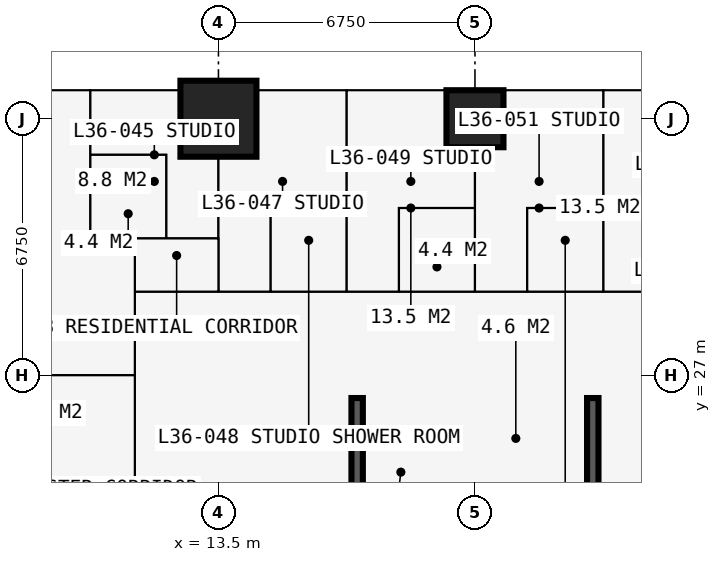
"""IFC4 building model, lengths in metres.
Left out: names, types, materials, properties, quantities, classifications, styles, units other than length and angle.
Written with IfcOpenShell. Run it as: python <this file> out.ifc"""

import sys

from ifc_helpers import new_model, si_unit, direction, frame, frame_2d, origin, origin_2d, place, context, subcontext, project, spatial, rectangle, extrude, element, fill, save


model = new_model("IFC4")
c1 = context("Model", 3, precision=1e-05, world=origin(), true_north=direction((0.0, 1.0)))
c2 = subcontext(c1, "Body", "Model", "MODEL_VIEW")
j1 = project(units=[si_unit("LENGTHUNIT", "METRE"), si_unit("PLANEANGLEUNIT", "RADIAN")], contexts=[c1])
p1 = place(None, origin())
s1 = spatial("IfcSite", under=j1, at=p1, CompositionType="ELEMENT")
p2 = place(p1, origin())
s2 = spatial("IfcBuilding", under=s1, at=p2, CompositionType="ELEMENT")
p3 = place(p2, frame((0.0, 0.0, 134.1)))
s3 = spatial("IfcBuildingStorey", under=s2, at=p3, CompositionType="ELEMENT", Elevation=134.1)
p4 = place(p3, frame((13.5, 33.75, 0.0), z_axis=(0.0, 0.0, 1.0), x_axis=(1.0, 0.0, 0.0)))
e1 = element("IfcColumn", 1, at=p4, inside=s3, PredefinedType="COLUMN", context=c2, shape_type="SweptSolid", body=[
    extrude(rectangle(XDim=2.0, YDim=2.0, at=origin_2d()), origin(), (0.0, 0.0, 1.0), 3.6),
])
p5 = place(p3, frame((20.25, 33.75, 0.0), z_axis=(0.0, 0.0, 1.0), x_axis=(1.0, 0.0, 0.0)))
e2 = element("IfcColumn", 2, at=p5, inside=s3, PredefinedType="COLUMN", context=c2, shape_type="SweptSolid", body=[
    extrude(rectangle(XDim=1.5, YDim=1.5, at=origin_2d()), origin(), (0.0, 0.0, 1.0), 3.6),
])
p6 = place(p3, frame((27.6, 27.0, 0.0), z_axis=(0.0, 0.0, 1.0), x_axis=(-1.0, 0.0, 0.0)))
e3 = element("IfcWall", 3, at=p6, inside=s3, PredefinedType="SHEAR", context=c2, shape_type="SweptSolid", body=[
    extrude(rectangle(XDim=14.7, YDim=1.2, at=frame_2d((7.35, 0.0))), origin(), (0.0, 0.0, 1.0), 3.6),
])
p7 = place(p6, frame((5.225, 0.0, 0.0)))
e4 = element("IfcOpeningElement", 4, at=p7, cuts=e3, PredefinedType="OPENING", context=c2, shape_type="SweptSolid", body=[
    extrude(rectangle(XDim=0.9, YDim=2.2, at=frame_2d((0.45, 1.1))), frame((0.0, 0.61, 0.0), z_axis=(0.0, -1.0, 0.0), x_axis=(1.0, 0.0, 0.0)), (0.0, 0.0, 1.0), 1.22),
])
p8 = place(p6, frame((8.2, 0.0, 0.0)))
e5 = element("IfcOpeningElement", 5, at=p8, cuts=e3, PredefinedType="OPENING", context=c2, shape_type="SweptSolid", body=[
    extrude(rectangle(XDim=1.0, YDim=2.2, at=frame_2d((0.5, 1.1))), frame((0.0, 0.61, 0.0), z_axis=(0.0, -1.0, 0.0), x_axis=(1.0, 0.0, 0.0)), (0.0, 0.0, 1.0), 1.22),
])
p9 = place(p3, frame((13.5, 26.4, 0.0), z_axis=(0.0, 0.0, 1.0), x_axis=(0.0, -1.0, 0.0)))
e6 = element("IfcWall", 6, at=p9, inside=s3, PredefinedType="SHEAR", context=c2, shape_type="SweptSolid", body=[
    extrude(rectangle(XDim=12.3, YDim=1.2, at=frame_2d((6.15, 0.0))), origin(), (0.0, 0.0, 1.0), 3.6),
])
p10 = place(p9, frame((7.45, 0.0, 0.0)))
e7 = element("IfcOpeningElement", 7, at=p10, cuts=e6, PredefinedType="OPENING", context=c2, shape_type="SweptSolid", body=[
    extrude(rectangle(XDim=1.2, YDim=2.2, at=frame_2d((0.6, 1.1))), frame((0.0, 0.61, 0.0), z_axis=(0.0, -1.0, 0.0), x_axis=(1.0, 0.0, 0.0)), (0.0, 0.0, 1.0), 1.22),
])
p11 = place(p3, frame((20.25, 34.5, 0.0), z_axis=(0.0, 0.0, 1.0), x_axis=(1.0, 0.0, 0.0)))
e8 = element("IfcWall", 8, at=p11, inside=s3, PredefinedType="SOLIDWALL", context=c2, shape_type="SweptSolid", body=[
    extrude(rectangle(XDim=6.75, YDim=0.15, at=frame_2d((3.375, 0.0))), origin(), (0.0, 0.0, 1.0), 3.3),
])
p12 = place(p11, frame((0.863, 0.0, 0.0)))
e9 = element("IfcOpeningElement", 9, at=p12, cuts=e8, PredefinedType="OPENING", context=c2, shape_type="SweptSolid", body=[
    extrude(rectangle(XDim=1.0, YDim=2.2, at=frame_2d((0.5, 1.1))), frame((0.0, 0.085, 0.0), z_axis=(0.0, -1.0, 0.0), x_axis=(1.0, 0.0, 0.0)), (0.0, 0.0, 1.0), 0.17),
])
p13 = place(p11, frame((1.975, 0.0, 0.9)))
e10 = element("IfcOpeningElement", 10, at=p13, cuts=e8, PredefinedType="OPENING", context=c2, shape_type="SweptSolid", body=[
    extrude(rectangle(XDim=1.2, YDim=1.8, at=frame_2d((0.6, 0.9))), frame((0.0, 0.085, 0.0), z_axis=(0.0, -1.0, 0.0), x_axis=(1.0, 0.0, 0.0)), (0.0, 0.0, 1.0), 0.17),
])
p14 = place(p11, frame((4.621, 0.0, 0.0)))
e11 = element("IfcOpeningElement", 11, at=p14, cuts=e8, PredefinedType="OPENING", context=c2, shape_type="SweptSolid", body=[
    extrude(rectangle(XDim=1.0, YDim=2.2, at=frame_2d((0.5, 1.1))), frame((0.0, 0.085, 0.0), z_axis=(0.0, -1.0, 0.0), x_axis=(1.0, 0.0, 0.0)), (0.0, 0.0, 1.0), 0.17),
])
p15 = place(p11, frame((3.592, 0.0, 0.9)))
e12 = element("IfcOpeningElement", 12, at=p15, cuts=e8, PredefinedType="OPENING", context=c2, shape_type="SweptSolid", body=[
    extrude(rectangle(XDim=0.9, YDim=1.8, at=frame_2d((0.45, 0.9))), frame((0.0, 0.085, 0.0), z_axis=(0.0, -1.0, 0.0), x_axis=(1.0, 0.0, 0.0)), (0.0, 0.0, 1.0), 0.17),
])
p16 = place(p3, frame((23.625, 34.6, 0.0), z_axis=(0.0, 0.0, 1.0), x_axis=(0.0, 1.0, 0.0)))
e13 = element("IfcWall", 13, at=p16, inside=s3, PredefinedType="USERDEFINED", context=c2, shape_type="SweptSolid", body=[
    extrude(rectangle(XDim=2.2, YDim=1.0, at=frame_2d((1.1, 0.0))), origin(), (0.0, 0.0, 1.0), 0.9),
])
for number, where, z_axis, x_axis in (
    (14, (17.15, 20.3, 0.0), (0.0, 0.0, 1.0), (0.0, 1.0, 0.0)),
    (15, (23.35, 20.3, 0.0), (0.0, 0.0, 1.0), (0.0, 1.0, 0.0)),
):
    element("IfcWall", number, at=place(p3, frame(where, z_axis=z_axis, x_axis=x_axis)), inside=s3, PredefinedType="SHEAR", context=c2, shape_type="SweptSolid", body=[
        extrude(rectangle(XDim=6.1, YDim=0.3, at=frame_2d((3.05, 0.0))), origin(), (0.0, 0.0, 1.0), 3.6),
    ])
p17 = place(p3, frame((19.375, 23.4, 0.0), z_axis=(0.0, 0.0, 1.0), x_axis=(0.0, 1.0, 0.0)))
e16 = element("IfcWall", 16, at=p17, inside=s3, PredefinedType="PARTITIONING", context=c2, shape_type="SweptSolid", body=[
    extrude(rectangle(XDim=3.0, YDim=0.15, at=frame_2d((1.5, 0.0))), origin(), (0.0, 0.0, 1.0), 3.3),
])
p18 = place(p3, frame((19.45, 25.1, 0.0), z_axis=(0.0, 0.0, 1.0), x_axis=(1.0, 0.0, 0.0)))
e17 = element("IfcWall", 17, at=p18, inside=s3, PredefinedType="PARTITIONING", context=c2, shape_type="SweptSolid", body=[
    extrude(rectangle(XDim=3.75, YDim=0.15, at=frame_2d((1.875, 0.0))), origin(), (0.0, 0.0, 1.0), 3.3),
])
p19 = place(p18, frame((1.45, 0.0, 0.0)))
e18 = element("IfcOpeningElement", 18, at=p19, cuts=e17, PredefinedType="OPENING", context=c2, shape_type="SweptSolid", body=[
    extrude(rectangle(XDim=0.9, YDim=2.2, at=frame_2d((0.45, 1.1))), frame((0.0, 0.085, 0.0), z_axis=(0.0, -1.0, 0.0), x_axis=(1.0, 0.0, 0.0)), (0.0, 0.0, 1.0), 0.17),
])
p20 = place(p3, frame((-0.734, 27.0, 0.0), z_axis=(0.0, 0.0, 1.0), x_axis=(1.0, 0.0, 0.0)))
e19 = element("IfcWall", 19, at=p20, inside=s3, PredefinedType="PARTITIONING", context=c2, shape_type="SweptSolid", body=[
    extrude(rectangle(XDim=12.034, YDim=0.15, at=frame_2d((6.017, 0.0))), origin(), (0.0, 0.0, 1.0), 2.802),
])
p21 = place(p20, frame((8.434, 0.0, 0.0)))
e20 = element("IfcOpeningElement", 20, at=p21, cuts=e19, PredefinedType="OPENING", context=c2, shape_type="SweptSolid", body=[
    extrude(rectangle(XDim=1.0, YDim=2.2, at=frame_2d((0.5, 1.1))), frame((0.0, 0.085, 0.0), z_axis=(0.0, -1.0, 0.0), x_axis=(1.0, 0.0, 0.0)), (0.0, 0.0, 1.0), 0.17),
])
p22 = place(p3, frame((10.125, 30.6, 0.0), z_axis=(0.0, 0.0, 1.0), x_axis=(0.0, 1.0, 0.0)))
e21 = element("IfcWall", 21, at=p22, inside=s3, PredefinedType="PARTITIONING", context=c2, shape_type="SweptSolid", body=[
    extrude(rectangle(XDim=3.884, YDim=0.1, at=frame_2d((1.942, 0.0))), origin(), (0.0, 0.0, 1.0), 3.3),
])
p23 = place(p3, frame((10.125, 30.6, 0.0), z_axis=(0.0, 0.0, 1.0), x_axis=(1.0, 0.0, 0.0)))
e22 = element("IfcWall", 22, at=p23, inside=s3, PredefinedType="PARTITIONING", context=c2, shape_type="SweptSolid", body=[
    extrude(rectangle(XDim=3.375, YDim=0.1, at=frame_2d((1.688, 0.0))), origin(), (0.0, 0.0, 1.0), 3.3),
])
p24 = place(p23, frame((2.2, 0.0, 0.0)))
e23 = element("IfcOpeningElement", 23, at=p24, cuts=e22, PredefinedType="OPENING", context=c2, shape_type="SweptSolid", body=[
    extrude(rectangle(XDim=0.95, YDim=2.2, at=frame_2d((0.475, 1.1))), frame((0.0, 0.06, 0.0), z_axis=(0.0, -1.0, 0.0), x_axis=(1.0, 0.0, 0.0)), (0.0, 0.0, 1.0), 0.12),
])
p25 = place(p3, frame((10.125, 32.8, 0.0), z_axis=(0.0, 0.0, 1.0), x_axis=(1.0, 0.0, 0.0)))
e24 = element("IfcWall", 24, at=p25, inside=s3, PredefinedType="PARTITIONING", context=c2, shape_type="SweptSolid", body=[
    extrude(rectangle(XDim=2.0, YDim=0.1, at=frame_2d((1.0, 0.0))), origin(), (0.0, 0.0, 1.0), 3.3),
])
p26 = place(p3, frame((11.3, 11.3, 0.0), z_axis=(0.0, 0.0, 1.0), x_axis=(0.0, 1.0, 0.0)))
e25 = element("IfcWall", 25, at=p26, inside=s3, PredefinedType="PARTITIONING", context=c2, shape_type="SweptSolid", body=[
    extrude(rectangle(XDim=19.3, YDim=0.15, at=frame_2d((9.65, 0.0))), origin(), (0.0, 0.0, 1.0), 3.3),
])
p27 = place(p26, frame((13.525, 0.0, 0.0)))
e26 = element("IfcOpeningElement", 26, at=p27, cuts=e25, PredefinedType="OPENING", context=c2, shape_type="SweptSolid", body=[
    extrude(rectangle(XDim=1.0, YDim=2.2, at=frame_2d((0.5, 1.1))), frame((0.0, 0.085, 0.0), z_axis=(0.0, -1.0, 0.0), x_axis=(1.0, 0.0, 0.0)), (0.0, 0.0, 1.0), 0.17),
])
p28 = place(p26, frame((10.438, 0.0, 0.0)))
e27 = element("IfcOpeningElement", 27, at=p28, cuts=e25, PredefinedType="OPENING", context=c2, shape_type="SweptSolid", body=[
    extrude(rectangle(XDim=1.0, YDim=2.2, at=frame_2d((0.5, 1.1))), frame((0.0, 0.085, 0.0), z_axis=(0.0, -1.0, 0.0), x_axis=(1.0, 0.0, 0.0)), (0.0, 0.0, 1.0), 0.17),
])
p29 = place(p3, frame((11.3, 29.2, 0.0), z_axis=(0.0, 0.0, 1.0), x_axis=(1.0, 0.0, 0.0)))
e28 = element("IfcWall", 28, at=p29, inside=s3, PredefinedType="PARTITIONING", context=c2, shape_type="SweptSolid", body=[
    extrude(rectangle(XDim=19.075, YDim=0.15, at=frame_2d((9.538, 0.0))), origin(), (0.0, 0.0, 1.0), 3.3),
])
p30 = place(p29, frame((5.825, 0.0, 0.0)))
e29 = element("IfcOpeningElement", 29, at=p30, cuts=e28, PredefinedType="OPENING", context=c2, shape_type="SweptSolid", body=[
    extrude(rectangle(XDim=0.95, YDim=2.2, at=frame_2d((0.475, 1.1))), frame((0.0, 0.085, 0.0), z_axis=(0.0, -1.0, 0.0), x_axis=(1.0, 0.0, 0.0)), (0.0, 0.0, 1.0), 0.17),
])
p31 = place(p29, frame((9.2, 0.0, 0.0)))
e30 = element("IfcOpeningElement", 30, at=p31, cuts=e28, PredefinedType="OPENING", context=c2, shape_type="SweptSolid", body=[
    extrude(rectangle(XDim=0.95, YDim=2.2, at=frame_2d((0.475, 1.1))), frame((0.0, 0.085, 0.0), z_axis=(0.0, -1.0, 0.0), x_axis=(1.0, 0.0, 0.0)), (0.0, 0.0, 1.0), 0.17),
])
p32 = place(p29, frame((0.6, 0.0, 0.0)))
e31 = element("IfcOpeningElement", 31, at=p32, cuts=e28, PredefinedType="OPENING", context=c2, shape_type="SweptSolid", body=[
    extrude(rectangle(XDim=1.0, YDim=2.2, at=frame_2d((0.5, 1.1))), frame((0.0, 0.085, 0.0), z_axis=(0.0, -1.0, 0.0), x_axis=(1.0, 0.0, 0.0)), (0.0, 0.0, 1.0), 0.17),
])
p33 = place(p3, frame((12.125, 30.6, 0.0), z_axis=(0.0, 0.0, 1.0), x_axis=(0.0, 1.0, 0.0)))
e32 = element("IfcWall", 32, at=p33, inside=s3, PredefinedType="PARTITIONING", context=c2, shape_type="SweptSolid", body=[
    extrude(rectangle(XDim=2.2, YDim=0.1, at=frame_2d((1.1, 0.0))), origin(), (0.0, 0.0, 1.0), 3.3),
])
p34 = place(p33, frame((0.65, 0.0, 0.0)))
e33 = element("IfcOpeningElement", 33, at=p34, cuts=e32, PredefinedType="OPENING", context=c2, shape_type="SweptSolid", body=[
    extrude(rectangle(XDim=0.9, YDim=2.2, at=frame_2d((0.45, 1.1))), frame((0.0, 0.06, 0.0), z_axis=(0.0, -1.0, 0.0), x_axis=(1.0, 0.0, 0.0)), (0.0, 0.0, 1.0), 0.12),
])
p35 = place(p3, frame((13.5, 29.2, 0.0), z_axis=(0.0, 0.0, 1.0), x_axis=(0.0, 1.0, 0.0)))
e34 = element("IfcWall", 34, at=p35, inside=s3, PredefinedType="PARTITIONING", context=c2, shape_type="SweptSolid", body=[
    extrude(rectangle(XDim=5.284, YDim=0.175, at=frame_2d((2.642, 0.0))), origin(), (0.0, 0.0, 1.0), 2.731),
])
p36 = place(p35, frame((0.25, 0.0, 0.0)))
e35 = element("IfcOpeningElement", 35, at=p36, cuts=e34, PredefinedType="OPENING", context=c2, shape_type="SweptSolid", body=[
    extrude(rectangle(XDim=0.95, YDim=2.2, at=frame_2d((0.475, 1.1))), frame((0.0, 0.097, 0.0), z_axis=(0.0, -1.0, 0.0), x_axis=(1.0, 0.0, 0.0)), (0.0, 0.0, 1.0), 0.195),
])
p37 = place(p3, frame((14.875, 29.2, 0.0), z_axis=(0.0, 0.0, 1.0), x_axis=(0.0, 1.0, 0.0)))
e36 = element("IfcWall", 36, at=p37, inside=s3, PredefinedType="PARTITIONING", context=c2, shape_type="SweptSolid", body=[
    extrude(rectangle(XDim=2.2, YDim=0.1, at=frame_2d((1.1, 0.0))), origin(), (0.0, 0.0, 1.0), 3.3),
])
p38 = place(p37, frame((0.65, 0.0, 0.0)))
e37 = element("IfcOpeningElement", 37, at=p38, cuts=e36, PredefinedType="OPENING", context=c2, shape_type="SweptSolid", body=[
    extrude(rectangle(XDim=0.9, YDim=2.2, at=frame_2d((0.45, 1.1))), frame((0.0, 0.06, 0.0), z_axis=(0.0, -1.0, 0.0), x_axis=(1.0, 0.0, 0.0)), (0.0, 0.0, 1.0), 0.12),
])
p39 = place(p3, frame((14.875, 31.4, 0.0), z_axis=(0.0, 0.0, 1.0), x_axis=(1.0, 0.0, 0.0)))
e38 = element("IfcWall", 38, at=p39, inside=s3, PredefinedType="PARTITIONING", context=c2, shape_type="SweptSolid", body=[
    extrude(rectangle(XDim=2.0, YDim=0.1, at=frame_2d((1.0, 0.0))), origin(), (0.0, 0.0, 1.0), 3.3),
])
p40 = place(p3, frame((16.875, 29.2, 0.0), z_axis=(0.0, 0.0, 1.0), x_axis=(0.0, 1.0, 0.0)))
e39 = element("IfcWall", 39, at=p40, inside=s3, PredefinedType="PARTITIONING", context=c2, shape_type="SweptSolid", body=[
    extrude(rectangle(XDim=5.284, YDim=0.175, at=frame_2d((2.642, 0.0))), origin(), (0.0, 0.0, 1.0), 3.3),
])
p41 = place(p3, frame((18.25, 29.2, 0.0), z_axis=(0.0, 0.0, 1.0), x_axis=(0.0, 1.0, 0.0)))
e40 = element("IfcWall", 40, at=p41, inside=s3, PredefinedType="PARTITIONING", context=c2, shape_type="SweptSolid", body=[
    extrude(rectangle(XDim=2.2, YDim=0.1, at=frame_2d((1.1, 0.0))), origin(), (0.0, 0.0, 1.0), 3.3),
])
p42 = place(p41, frame((0.65, 0.0, 0.0)))
e41 = element("IfcOpeningElement", 41, at=p42, cuts=e40, PredefinedType="OPENING", context=c2, shape_type="SweptSolid", body=[
    extrude(rectangle(XDim=0.9, YDim=2.2, at=frame_2d((0.45, 1.1))), frame((0.0, 0.06, 0.0), z_axis=(0.0, -1.0, 0.0), x_axis=(1.0, 0.0, 0.0)), (0.0, 0.0, 1.0), 0.12),
])
p43 = place(p3, frame((18.25, 31.4, 0.0), z_axis=(0.0, 0.0, 1.0), x_axis=(1.0, 0.0, 0.0)))
e42 = element("IfcWall", 42, at=p43, inside=s3, PredefinedType="PARTITIONING", context=c2, shape_type="SweptSolid", body=[
    extrude(rectangle(XDim=2.0, YDim=0.1, at=frame_2d((1.0, 0.0))), origin(), (0.0, 0.0, 1.0), 3.3),
])
p44 = place(p3, frame((20.25, 29.2, 0.0), z_axis=(0.0, 0.0, 1.0), x_axis=(0.0, 1.0, 0.0)))
e43 = element("IfcWall", 43, at=p44, inside=s3, PredefinedType="PARTITIONING", context=c2, shape_type="SweptSolid", body=[
    extrude(rectangle(XDim=5.284, YDim=0.175, at=frame_2d((2.642, 0.0))), origin(), (0.0, 0.0, 1.0), 2.802),
])
p45 = place(p3, frame((21.625, 29.2, 0.0), z_axis=(0.0, 0.0, 1.0), x_axis=(0.0, 1.0, 0.0)))
e44 = element("IfcWall", 44, at=p45, inside=s3, PredefinedType="PARTITIONING", context=c2, shape_type="SweptSolid", body=[
    extrude(rectangle(XDim=2.2, YDim=0.1, at=frame_2d((1.1, 0.0))), origin(), (0.0, 0.0, 1.0), 3.3),
])
p46 = place(p45, frame((0.65, 0.0, 0.0)))
e45 = element("IfcOpeningElement", 45, at=p46, cuts=e44, PredefinedType="OPENING", context=c2, shape_type="SweptSolid", body=[
    extrude(rectangle(XDim=0.9, YDim=2.2, at=frame_2d((0.45, 1.1))), frame((0.0, 0.06, 0.0), z_axis=(0.0, -1.0, 0.0), x_axis=(1.0, 0.0, 0.0)), (0.0, 0.0, 1.0), 0.12),
])
p47 = place(p3, frame((21.625, 31.4, 0.0), z_axis=(0.0, 0.0, 1.0), x_axis=(1.0, 0.0, 0.0)))
e46 = element("IfcWall", 46, at=p47, inside=s3, PredefinedType="PARTITIONING", context=c2, shape_type="SweptSolid", body=[
    extrude(rectangle(XDim=2.0, YDim=0.1, at=frame_2d((1.0, 0.0))), origin(), (0.0, 0.0, 1.0), 3.3),
])
p48 = place(p3, frame((23.625, 29.2, 0.0), z_axis=(0.0, 0.0, 1.0), x_axis=(0.0, 1.0, 0.0)))
e47 = element("IfcWall", 47, at=p48, inside=s3, PredefinedType="PARTITIONING", context=c2, shape_type="SweptSolid", body=[
    extrude(rectangle(XDim=5.284, YDim=0.15, at=frame_2d((2.642, 0.0))), origin(), (0.0, 0.0, 1.0), 3.3),
])
p49 = place(p12, origin())
e48 = element("IfcDoor", 48, at=p49, inside=s3, OperationType="SINGLE_SWING_LEFT", PredefinedType="DOOR", context=c2, shape_type="SweptSolid", body=[
    extrude(rectangle(XDim=1.0, YDim=2.2, at=frame_2d((0.5, 1.1))), frame((0.0, 0.025, 0.0), z_axis=(0.0, -1.0, 0.0), x_axis=(1.0, 0.0, 0.0)), (0.0, 0.0, 1.0), 0.05),
])
fill(e9, e48)
p50 = place(p13, origin())
e49 = element("IfcWindow", 49, at=p50, inside=s3, PartitioningType="SINGLE_PANEL", PredefinedType="WINDOW", context=c2, shape_type="SweptSolid", body=[
    extrude(rectangle(XDim=1.2, YDim=1.8, at=frame_2d((0.6, 0.9))), frame((0.0, 0.03, 0.0), z_axis=(0.0, -1.0, 0.0), x_axis=(1.0, 0.0, 0.0)), (0.0, 0.0, 1.0), 0.06),
])
fill(e10, e49)
p51 = place(p15, origin())
e50 = element("IfcWindow", 50, at=p51, inside=s3, PartitioningType="SINGLE_PANEL", PredefinedType="WINDOW", context=c2, shape_type="SweptSolid", body=[
    extrude(rectangle(XDim=0.9, YDim=1.8, at=frame_2d((0.45, 0.9))), frame((0.0, 0.03, 0.0), z_axis=(0.0, -1.0, 0.0), x_axis=(1.0, 0.0, 0.0)), (0.0, 0.0, 1.0), 0.06),
])
fill(e12, e50)
p52 = place(p19, origin())
e51 = element("IfcDoor", 51, at=p52, inside=s3, OperationType="SINGLE_SWING_RIGHT", PredefinedType="DOOR", context=c2, shape_type="SweptSolid", body=[
    extrude(rectangle(XDim=0.9, YDim=2.2, at=frame_2d((0.45, 1.1))), frame((0.0, 0.025, 0.0), z_axis=(0.0, -1.0, 0.0), x_axis=(1.0, 0.0, 0.0)), (0.0, 0.0, 1.0), 0.05),
])
fill(e18, e51)
p53 = place(p7, origin())
e52 = element("IfcDoor", 52, at=p53, inside=s3, OperationType="SINGLE_SWING_LEFT", PredefinedType="DOOR", context=c2, shape_type="SweptSolid", body=[
    extrude(rectangle(XDim=0.9, YDim=2.2, at=frame_2d((0.45, 1.1))), frame((0.0, 0.4, 0.0), z_axis=(0.0, -1.0, 0.0), x_axis=(1.0, 0.0, 0.0)), (0.0, 0.0, 1.0), 0.8),
])
fill(e4, e52)
p54 = place(p8, origin())
e53 = element("IfcDoor", 53, at=p54, inside=s3, OperationType="SINGLE_SWING_LEFT", PredefinedType="DOOR", context=c2, shape_type="SweptSolid", body=[
    extrude(rectangle(XDim=1.0, YDim=2.2, at=frame_2d((0.5, 1.1))), frame((0.0, 0.025, 0.0), z_axis=(0.0, -1.0, 0.0), x_axis=(1.0, 0.0, 0.0)), (0.0, 0.0, 1.0), 0.05),
])
fill(e5, e53)
p55 = place(p24, origin())
e54 = element("IfcDoor", 54, at=p55, inside=s3, OperationType="SINGLE_SWING_LEFT", PredefinedType="DOOR", context=c2, shape_type="SweptSolid", body=[
    extrude(rectangle(XDim=0.95, YDim=2.2, at=frame_2d((0.475, 1.1))), frame((0.0, 0.025, 0.0), z_axis=(0.0, -1.0, 0.0), x_axis=(1.0, 0.0, 0.0)), (0.0, 0.0, 1.0), 0.05),
])
fill(e23, e54)
p56 = place(p34, origin())
e55 = element("IfcDoor", 55, at=p56, inside=s3, OperationType="SINGLE_SWING_RIGHT", PredefinedType="DOOR", context=c2, shape_type="SweptSolid", body=[
    extrude(rectangle(XDim=0.9, YDim=2.2, at=frame_2d((0.45, 1.1))), frame((0.0, 0.025, 0.0), z_axis=(0.0, -1.0, 0.0), x_axis=(1.0, 0.0, 0.0)), (0.0, 0.0, 1.0), 0.05),
])
fill(e33, e55)
p57 = place(p36, origin())
e56 = element("IfcDoor", 56, at=p57, inside=s3, OperationType="SINGLE_SWING_LEFT", PredefinedType="DOOR", context=c2, shape_type="SweptSolid", body=[
    extrude(rectangle(XDim=0.95, YDim=2.2, at=frame_2d((0.475, 1.1))), frame((0.0, 0.025, 0.0), z_axis=(0.0, -1.0, 0.0), x_axis=(1.0, 0.0, 0.0)), (0.0, 0.0, 1.0), 0.05),
])
fill(e35, e56)
p58 = place(p38, origin())
e57 = element("IfcDoor", 57, at=p58, inside=s3, OperationType="SINGLE_SWING_RIGHT", PredefinedType="DOOR", context=c2, shape_type="SweptSolid", body=[
    extrude(rectangle(XDim=0.9, YDim=2.2, at=frame_2d((0.45, 1.1))), frame((0.0, 0.025, 0.0), z_axis=(0.0, -1.0, 0.0), x_axis=(1.0, 0.0, 0.0)), (0.0, 0.0, 1.0), 0.05),
])
fill(e37, e57)
p59 = place(p30, origin())
e58 = element("IfcDoor", 58, at=p59, inside=s3, OperationType="SINGLE_SWING_LEFT", PredefinedType="DOOR", context=c2, shape_type="SweptSolid", body=[
    extrude(rectangle(XDim=0.95, YDim=2.2, at=frame_2d((0.475, 1.1))), frame((0.0, 0.025, 0.0), z_axis=(0.0, -1.0, 0.0), x_axis=(1.0, 0.0, 0.0)), (0.0, 0.0, 1.0), 0.05),
])
fill(e29, e58)
p60 = place(p42, origin())
e59 = element("IfcDoor", 59, at=p60, inside=s3, OperationType="SINGLE_SWING_RIGHT", PredefinedType="DOOR", context=c2, shape_type="SweptSolid", body=[
    extrude(rectangle(XDim=0.9, YDim=2.2, at=frame_2d((0.45, 1.1))), frame((0.0, 0.025, 0.0), z_axis=(0.0, -1.0, 0.0), x_axis=(1.0, 0.0, 0.0)), (0.0, 0.0, 1.0), 0.05),
])
fill(e41, e59)
p61 = place(p31, origin())
e60 = element("IfcDoor", 60, at=p61, inside=s3, OperationType="SINGLE_SWING_LEFT", PredefinedType="DOOR", context=c2, shape_type="SweptSolid", body=[
    extrude(rectangle(XDim=0.95, YDim=2.2, at=frame_2d((0.475, 1.1))), frame((0.0, 0.025, 0.0), z_axis=(0.0, -1.0, 0.0), x_axis=(1.0, 0.0, 0.0)), (0.0, 0.0, 1.0), 0.05),
])
fill(e30, e60)
p62 = place(p46, origin())
e61 = element("IfcDoor", 61, at=p62, inside=s3, OperationType="SINGLE_SWING_RIGHT", PredefinedType="DOOR", context=c2, shape_type="SweptSolid", body=[
    extrude(rectangle(XDim=0.9, YDim=2.2, at=frame_2d((0.45, 1.1))), frame((0.0, 0.025, 0.0), z_axis=(0.0, -1.0, 0.0), x_axis=(1.0, 0.0, 0.0)), (0.0, 0.0, 1.0), 0.05),
])
fill(e45, e61)
p63 = place(p32, origin())
e62 = element("IfcDoor", 62, at=p63, inside=s3, OperationType="SINGLE_SWING_LEFT", PredefinedType="DOOR", context=c2, shape_type="SweptSolid", body=[
    extrude(rectangle(XDim=1.0, YDim=2.2, at=frame_2d((0.5, 1.1))), frame((0.0, 0.025, 0.0), z_axis=(0.0, -1.0, 0.0), x_axis=(1.0, 0.0, 0.0)), (0.0, 0.0, 1.0), 0.05),
])
fill(e31, e62)
p64 = place(p27, origin())
e63 = element("IfcDoor", 63, at=p64, inside=s3, OperationType="SINGLE_SWING_LEFT", PredefinedType="DOOR", context=c2, shape_type="SweptSolid", body=[
    extrude(rectangle(XDim=1.0, YDim=2.2, at=frame_2d((0.5, 1.1))), frame((0.0, 0.025, 0.0), z_axis=(0.0, -1.0, 0.0), x_axis=(1.0, 0.0, 0.0)), (0.0, 0.0, 1.0), 0.05),
])
fill(e26, e63)
save(model, sys.argv[1])
